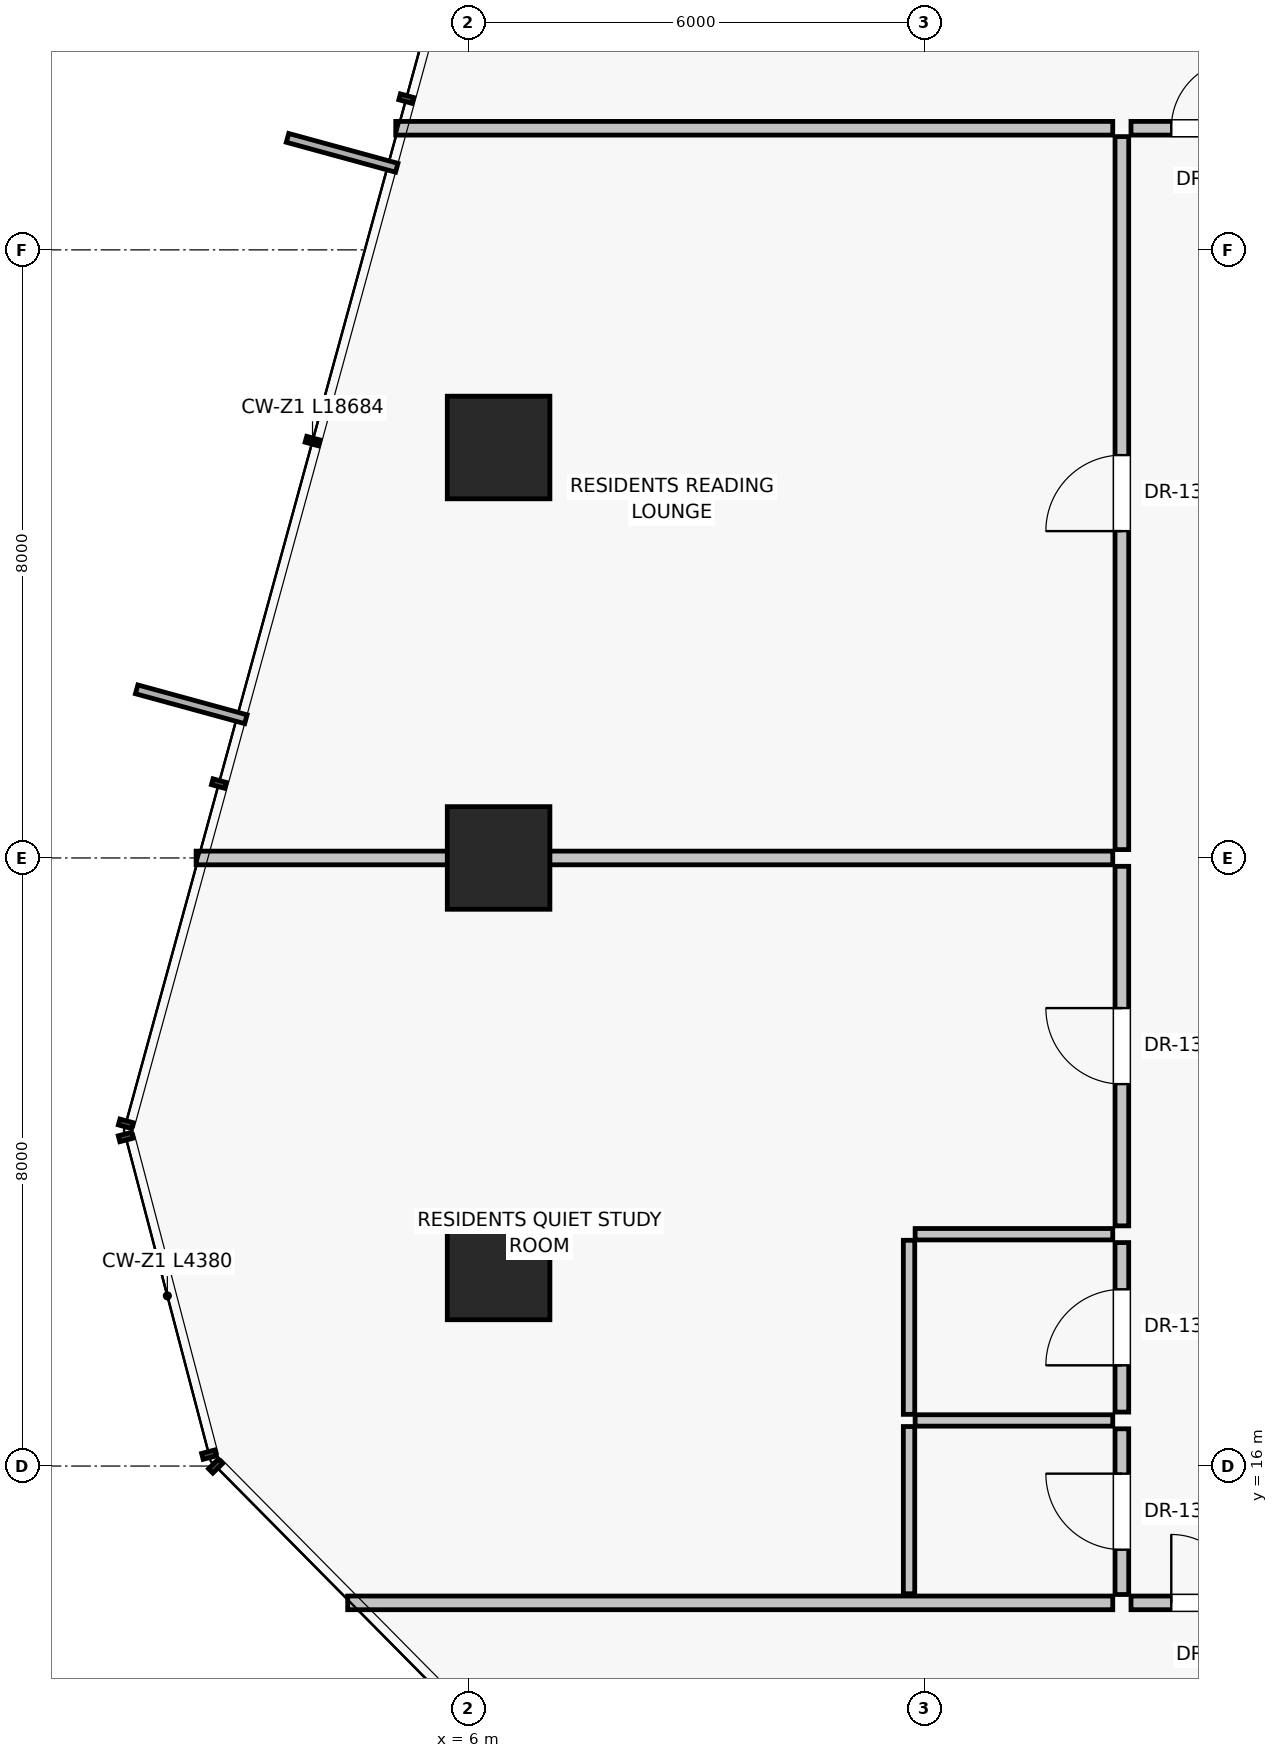
"""IFC4 building model, lengths in metres.
Left out: names, types, materials, properties, quantities, classifications, styles, units other than length and angle.
Written with IfcOpenShell. Run it as: python <this file> out.ifc"""

import sys

from ifc_helpers import new_model, si_unit, direction, frame, frame_2d, origin, origin_2d, place, context, subcontext, project, spatial, rectangle, extrude, source, transform, mapped, element, fill, save


model = new_model("IFC4")
c1 = context("Model", 3, precision=1e-05, world=origin(), true_north=direction((0.0, 1.0)))
c2 = subcontext(c1, "Body", "Model", "MODEL_VIEW")
j1 = project(units=[si_unit("LENGTHUNIT", "METRE"), si_unit("PLANEANGLEUNIT", "RADIAN")], contexts=[c1])
p1 = place(None, origin())
s1 = spatial("IfcSite", under=j1, at=p1, CompositionType="ELEMENT")
p2 = place(p1, origin())
s2 = spatial("IfcBuilding", under=s1, at=p2, CompositionType="ELEMENT")
p3 = place(p2, frame((0.0, 0.0, 73.85)))
s3 = spatial("IfcBuildingStorey", under=s2, at=p3, CompositionType="ELEMENT", Elevation=73.85)
for number, where, z_axis, x_axis in (
    (1, (6.4, 29.4, 0.0), (0.0, 0.0, 1.0), (1.0, 0.0, 0.0)),
    (2, (6.4, 24.0, 0.0), (0.0, 0.0, 1.0), (1.0, 0.0, 0.0)),
    (3, (6.4, 18.6, 0.0), (0.0, 0.0, 1.0), (1.0, 0.0, 0.0)),
):
    element("IfcColumn", number, at=place(p3, frame(where, z_axis=z_axis, x_axis=x_axis)), inside=s3, PredefinedType="COLUMN", context=c2, shape_type="SweptSolid", body=[
        extrude(rectangle(XDim=1.35, YDim=1.35, at=origin_2d()), origin(), (0.0, 0.0, 1.0), 3.25),
    ])
p4 = place(p3, frame((14.48, 14.2, 0.0), z_axis=(0.0, 0.0, 1.0), x_axis=(-1.0, 0.0, 0.0)))
e4 = element("IfcWall", 4, at=p4, inside=s3, PredefinedType="PARTITIONING", context=c2, shape_type="SweptSolid", body=[
    extrude(rectangle(XDim=10.065, YDim=0.18, at=frame_2d((5.033, 0.0))), origin(), (0.0, 0.0, 1.0), 3.0),
])
p5 = place(p3, frame((14.48, 33.6, 0.0), z_axis=(0.0, 0.0, 1.0), x_axis=(-1.0, 0.0, 0.0)))
e5 = element("IfcWall", 5, at=p5, inside=s3, PredefinedType="PARTITIONING", context=c2, shape_type="SweptSolid", body=[
    extrude(rectangle(XDim=9.433, YDim=0.18, at=frame_2d((4.717, 0.0))), origin(), (0.0, 0.0, 1.0), 3.0),
])
p6 = place(p3, frame((14.6, 14.31, 0.0), z_axis=(0.0, 0.0, 1.0), x_axis=(0.0, 1.0, 0.0)))
e6 = element("IfcWall", 6, at=p6, inside=s3, PredefinedType="PARTITIONING", context=c2, shape_type="SweptSolid", body=[
    extrude(rectangle(XDim=2.18, YDim=0.18, at=frame_2d((1.09, 0.0))), origin(), (0.0, 0.0, 1.0), 3.0),
])
p7 = place(p6, frame((0.59, 0.0, 0.0)))
e7 = element("IfcOpeningElement", 7, at=p7, cuts=e6, PredefinedType="OPENING", context=c2, shape_type="SweptSolid", body=[
    extrude(rectangle(XDim=1.0, YDim=2.01, at=frame_2d((0.5, 1.005))), frame((0.0, 0.1, 0.0), z_axis=(0.0, -1.0, 0.0), x_axis=(1.0, 0.0, 0.0)), (0.0, 0.0, 1.0), 0.2),
])
p8 = place(p3, frame((14.6, 16.71, 0.0), z_axis=(0.0, 0.0, 1.0), x_axis=(0.0, 1.0, 0.0)))
e8 = element("IfcWall", 8, at=p8, inside=s3, PredefinedType="PARTITIONING", context=c2, shape_type="SweptSolid", body=[
    extrude(rectangle(XDim=2.23, YDim=0.18, at=frame_2d((1.115, 0.0))), origin(), (0.0, 0.0, 1.0), 3.0),
])
p9 = place(p8, frame((0.615, 0.0, 0.0)))
e9 = element("IfcOpeningElement", 9, at=p9, cuts=e8, PredefinedType="OPENING", context=c2, shape_type="SweptSolid", body=[
    extrude(rectangle(XDim=1.0, YDim=2.01, at=frame_2d((0.5, 1.005))), frame((0.0, 0.1, 0.0), z_axis=(0.0, -1.0, 0.0), x_axis=(1.0, 0.0, 0.0)), (0.0, 0.0, 1.0), 0.2),
])
p10 = place(p3, frame((14.6, 19.16, 0.0), z_axis=(0.0, 0.0, 1.0), x_axis=(0.0, 1.0, 0.0)))
e10 = element("IfcWall", 10, at=p10, inside=s3, PredefinedType="PARTITIONING", context=c2, shape_type="SweptSolid", body=[
    extrude(rectangle(XDim=4.73, YDim=0.18, at=frame_2d((2.365, 0.0))), origin(), (0.0, 0.0, 1.0), 3.0),
])
p11 = place(p10, frame((1.865, 0.0, 0.0)))
e11 = element("IfcOpeningElement", 11, at=p11, cuts=e10, PredefinedType="OPENING", context=c2, shape_type="SweptSolid", body=[
    extrude(rectangle(XDim=1.0, YDim=2.01, at=frame_2d((0.5, 1.005))), frame((0.0, 0.1, 0.0), z_axis=(0.0, -1.0, 0.0), x_axis=(1.0, 0.0, 0.0)), (0.0, 0.0, 1.0), 0.2),
])
p12 = place(p3, frame((14.6, 24.11, 0.0), z_axis=(0.0, 0.0, 1.0), x_axis=(0.0, 1.0, 0.0)))
e12 = element("IfcWall", 12, at=p12, inside=s3, PredefinedType="PARTITIONING", context=c2, shape_type="SweptSolid", body=[
    extrude(rectangle(XDim=9.38, YDim=0.18, at=frame_2d((4.69, 0.0))), origin(), (0.0, 0.0, 1.0), 3.0),
])
p13 = place(p12, frame((4.19, 0.0, 0.0)))
e13 = element("IfcOpeningElement", 13, at=p13, cuts=e12, PredefinedType="OPENING", context=c2, shape_type="SweptSolid", body=[
    extrude(rectangle(XDim=1.0, YDim=2.01, at=frame_2d((0.5, 1.005))), frame((0.0, 0.1, 0.0), z_axis=(0.0, -1.0, 0.0), x_axis=(1.0, 0.0, 0.0)), (0.0, 0.0, 1.0), 0.2),
])
for number, where, z_axis, x_axis in (
    (14, (14.48, 16.6, 0.0), (0.0, 0.0, 1.0), (-1.0, 0.0, 0.0)),
    (15, (14.48, 19.05, 0.0), (0.0, 0.0, 1.0), (-1.0, 0.0, 0.0)),
):
    element("IfcWall", number, at=place(p3, frame(where, z_axis=z_axis, x_axis=x_axis)), inside=s3, PredefinedType="PARTITIONING", context=c2, shape_type="SweptSolid", body=[
        extrude(rectangle(XDim=2.6, YDim=0.15, at=frame_2d((1.3, 0.0))), origin(), (0.0, 0.0, 1.0), 3.0),
    ])
p14 = place(p3, frame((11.8, 14.32, 0.0), z_axis=(0.0, 0.0, 1.0), x_axis=(0.0, 1.0, 0.0)))
e16 = element("IfcWall", 16, at=p14, inside=s3, PredefinedType="PARTITIONING", context=c2, shape_type="SweptSolid", body=[
    extrude(rectangle(XDim=2.2, YDim=0.15, at=frame_2d((1.1, 0.0))), origin(), (0.0, 0.0, 1.0), 3.0),
])
p15 = place(p3, frame((11.8, 16.68, 0.0), z_axis=(0.0, 0.0, 1.0), x_axis=(0.0, 1.0, 0.0)))
e17 = element("IfcWall", 17, at=p15, inside=s3, PredefinedType="PARTITIONING", context=c2, shape_type="SweptSolid", body=[
    extrude(rectangle(XDim=2.29, YDim=0.15, at=frame_2d((1.145, 0.0))), origin(), (0.0, 0.0, 1.0), 2.58),
])
p16 = place(p3, frame((14.48, 24.0, 0.0), z_axis=(0.0, 0.0, 1.0), x_axis=(-1.0, 0.0, 0.0)))
e18 = element("IfcWall", 18, at=p16, inside=s3, PredefinedType="PARTITIONING", context=c2, shape_type="SweptSolid", body=[
    extrude(rectangle(XDim=12.06, YDim=0.18, at=frame_2d((6.03, 0.0))), origin(), (0.0, 0.0, 1.0), 3.0),
])
p17 = place(p3, frame((14.72, 14.2, 0.0), z_axis=(0.0, 0.0, 1.0), x_axis=(1.0, 0.0, 0.0)))
e19 = element("IfcWall", 19, at=p17, inside=s3, PredefinedType="PARTITIONING", context=c2, shape_type="SweptSolid", body=[
    extrude(rectangle(XDim=1.96, YDim=0.18, at=frame_2d((0.98, 0.0))), origin(), (0.0, 0.0, 1.0), 3.0),
])
p18 = place(p17, frame((0.53, 0.0, 0.0)))
e20 = element("IfcOpeningElement", 20, at=p18, cuts=e19, PredefinedType="OPENING", context=c2, shape_type="SweptSolid", body=[
    extrude(rectangle(XDim=0.9, YDim=2.01, at=frame_2d((0.45, 1.005))), frame((0.0, 0.1, 0.0), z_axis=(0.0, -1.0, 0.0), x_axis=(1.0, 0.0, 0.0)), (0.0, 0.0, 1.0), 0.2),
])
p19 = place(p3, frame((14.72, 33.6, 0.0), z_axis=(0.0, 0.0, 1.0), x_axis=(1.0, 0.0, 0.0)))
e21 = element("IfcWall", 21, at=p19, inside=s3, PredefinedType="PARTITIONING", context=c2, shape_type="SweptSolid", body=[
    extrude(rectangle(XDim=1.96, YDim=0.18, at=frame_2d((0.98, 0.0))), origin(), (0.0, 0.0, 1.0), 3.0),
])
p20 = place(p19, frame((0.53, 0.0, 0.0)))
e22 = element("IfcOpeningElement", 22, at=p20, cuts=e21, PredefinedType="OPENING", context=c2, shape_type="SweptSolid", body=[
    extrude(rectangle(XDim=0.9, YDim=2.01, at=frame_2d((0.45, 1.005))), frame((0.0, 0.1, 0.0), z_axis=(0.0, -1.0, 0.0), x_axis=(1.0, 0.0, 0.0)), (0.0, 0.0, 1.0), 0.2),
])
m1 = source(origin(), c2, "Body", "SweptSolid", [
    extrude(rectangle(XDim=1.0, YDim=2.01, at=frame_2d((0.5, 1.005))), frame((0.0, 0.025, 0.0), z_axis=(0.0, -1.0, 0.0), x_axis=(1.0, 0.0, 0.0)), (0.0, 0.0, 1.0), 0.05),
])
p21 = place(p7, origin())
e23 = element("IfcDoor", 23, at=p21, inside=s3, OperationType="SINGLE_SWING_RIGHT", PredefinedType="DOOR", context=c2, shape_type="MappedRepresentation", body=[
    mapped(m1, transform((0.0, 0.0, 0.0), scale=1.0)),
])
fill(e7, e23)
p22 = place(p9, origin())
e24 = element("IfcDoor", 24, at=p22, inside=s3, OperationType="SINGLE_SWING_LEFT", PredefinedType="DOOR", context=c2, shape_type="MappedRepresentation", body=[
    mapped(m1, transform((0.0, 0.0, 0.0), scale=1.0)),
])
fill(e9, e24)
p23 = place(p11, origin())
e25 = element("IfcDoor", 25, at=p23, inside=s3, OperationType="SINGLE_SWING_RIGHT", PredefinedType="DOOR", context=c2, shape_type="MappedRepresentation", body=[
    mapped(m1, transform((0.0, 0.0, 0.0), scale=1.0)),
])
fill(e11, e25)
p24 = place(p13, origin())
e26 = element("IfcDoor", 26, at=p24, inside=s3, OperationType="SINGLE_SWING_LEFT", PredefinedType="DOOR", context=c2, shape_type="MappedRepresentation", body=[
    mapped(m1, transform((0.0, 0.0, 0.0), scale=1.0)),
])
fill(e13, e26)
m2 = source(origin(), c2, "Body", "SweptSolid", [
    extrude(rectangle(XDim=0.9, YDim=2.01, at=frame_2d((0.45, 1.005))), frame((0.0, 0.025, 0.0), z_axis=(0.0, -1.0, 0.0), x_axis=(1.0, 0.0, 0.0)), (0.0, 0.0, 1.0), 0.05),
])
p25 = place(p18, origin())
e27 = element("IfcDoor", 27, at=p25, inside=s3, OperationType="SINGLE_SWING_LEFT", PredefinedType="DOOR", context=c2, shape_type="MappedRepresentation", body=[
    mapped(m2, transform((0.0, 0.0, 0.0), scale=1.0)),
])
fill(e20, e27)
p26 = place(p20, origin())
e28 = element("IfcDoor", 28, at=p26, inside=s3, OperationType="SINGLE_SWING_RIGHT", PredefinedType="DOOR", context=c2, shape_type="MappedRepresentation", body=[
    mapped(m2, transform((0.0, 0.0, 0.0), scale=1.0)),
])
fill(e22, e28)
save(model, sys.argv[1])
